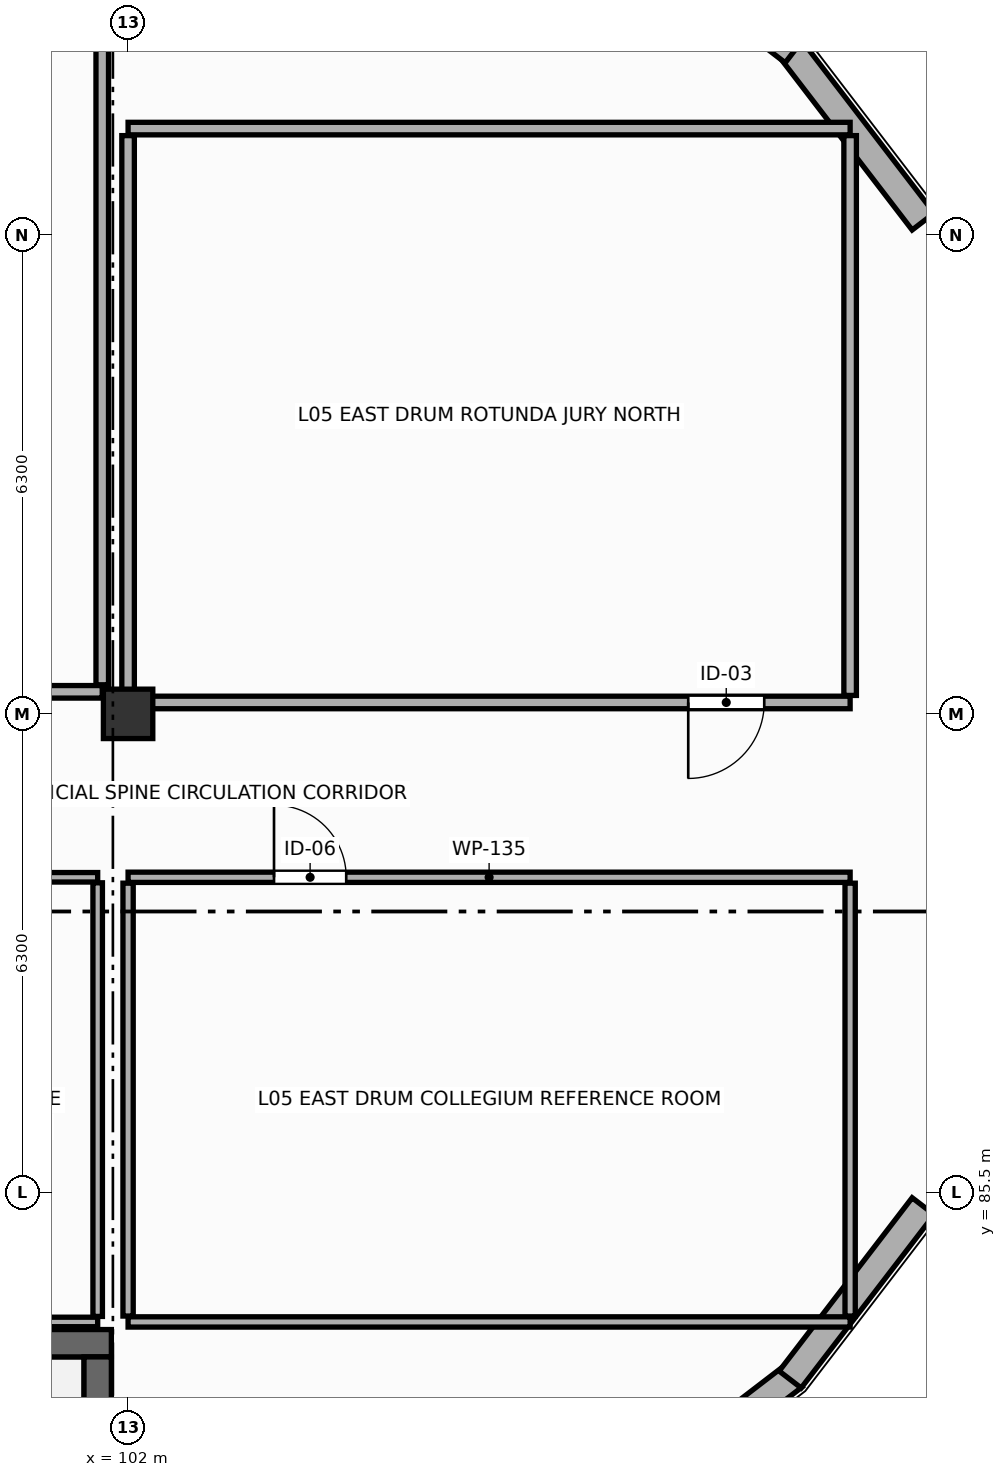
"""IFC4 building model, lengths in metres.
Left out: names, types, materials, properties, quantities, classifications, styles, units other than length and angle.
Written with IfcOpenShell. Run it as: python <this file> out.ifc"""

import sys

from ifc_helpers import new_model, si_unit, direction, frame, frame_2d, origin, origin_2d, place, context, subcontext, project, spatial, rectangle, extrude, element, fill, save


model = new_model("IFC4")
c1 = context("Model", 3, precision=1e-05, world=origin(), true_north=direction((0.0, 1.0)))
c2 = subcontext(c1, "Body", "Model", "MODEL_VIEW")
j1 = project(units=[si_unit("LENGTHUNIT", "METRE"), si_unit("PLANEANGLEUNIT", "RADIAN")], contexts=[c1])
p1 = place(None, origin())
s1 = spatial("IfcSite", under=j1, at=p1, CompositionType="ELEMENT")
p2 = place(p1, origin())
s2 = spatial("IfcBuilding", under=s1, at=p2, CompositionType="ELEMENT")
p3 = place(p2, frame((0.0, 0.0, 18.6)))
s3 = spatial("IfcBuildingStorey", under=s2, at=p3, CompositionType="ELEMENT", Elevation=18.6)
p4 = place(p3, frame((102.0, 91.8, 0.0), z_axis=(0.0, 0.0, 1.0), x_axis=(1.0, 0.0, 0.0)))
e1 = element("IfcColumn", 1, at=p4, inside=s3, PredefinedType="COLUMN", context=c2, shape_type="SweptSolid", body=[
    extrude(rectangle(XDim=0.65, YDim=0.65, at=origin_2d()), origin(), (0.0, 0.0, 1.0), 4.2),
])
p5 = place(p3, frame((108.477, 81.339, 0.0), z_axis=(0.0, 0.0, 1.0), x_axis=(0.793346533164, 0.608770300127, 0.0)))
e2 = element("IfcWall", 2, at=p5, inside=s3, PredefinedType="ELEMENTEDWALL", context=c2, shape_type="SweptSolid", body=[
    extrude(rectangle(XDim=2.874, YDim=0.365, at=frame_2d((1.437, 0.0))), origin(), (0.0, 0.0, 1.0), 2.99),
])
p6 = place(p5, frame((1.037, 0.0, 0.85)))
e3 = element("IfcOpeningElement", 3, at=p6, cuts=e2, PredefinedType="OPENING", context=c2, shape_type="SweptSolid", body=[
    extrude(rectangle(XDim=0.8, YDim=1.7, at=frame_2d((0.4, 0.85))), frame((0.0, 0.192, 0.0), z_axis=(0.0, -1.0, 0.0), x_axis=(1.0, 0.0, 0.0)), (0.0, 0.0, 1.0), 0.385),
])
p7 = place(p3, frame((110.711, 83.042, 0.0), z_axis=(0.0, 0.0, 1.0), x_axis=(0.608729278603, 0.79337800913, 0.0)))
e4 = element("IfcWall", 4, at=p7, inside=s3, PredefinedType="ELEMENTEDWALL", context=c2, shape_type="SweptSolid", body=[
    extrude(rectangle(XDim=2.875, YDim=0.365, at=frame_2d((1.437, 0.0))), origin(), (0.0, 0.0, 1.0), 3.09),
])
p8 = place(p3, frame((112.461, 98.277, 0.0), z_axis=(0.0, 0.0, 1.0), x_axis=(-0.608770300127, 0.793346533164, 0.0)))
e5 = element("IfcWall", 5, at=p8, inside=s3, PredefinedType="ELEMENTEDWALL", context=c2, shape_type="SweptSolid", body=[
    extrude(rectangle(XDim=2.874, YDim=0.365, at=frame_2d((1.437, 0.0))), origin(), (0.0, 0.0, 1.0), 3.09),
])
p9 = place(p3, frame((110.757, 100.511, 0.0), z_axis=(0.0, 0.0, 1.0), x_axis=(-0.793346533164, 0.608770300127, 0.0)))
e6 = element("IfcWall", 6, at=p9, inside=s3, PredefinedType="ELEMENTEDWALL", context=c2, shape_type="SweptSolid", body=[
    extrude(rectangle(XDim=2.874, YDim=0.365, at=frame_2d((1.437, 0.0))), origin(), (0.0, 0.0, 1.0), 2.99),
])
p10 = place(p9, frame((1.037, 0.0, 0.85)))
e7 = element("IfcOpeningElement", 7, at=p10, cuts=e6, PredefinedType="OPENING", context=c2, shape_type="SweptSolid", body=[
    extrude(rectangle(XDim=0.8, YDim=1.7, at=frame_2d((0.4, 0.85))), frame((0.0, 0.192, 0.0), z_axis=(0.0, -1.0, 0.0), x_axis=(1.0, 0.0, 0.0)), (0.0, 0.0, 1.0), 0.385),
])
p11 = place(p3, frame((92.42, 83.52, 0.0), z_axis=(0.0, 0.0, 1.0), x_axis=(1.0, 0.0, 0.0)))
e8 = element("IfcWall", 8, at=p11, inside=s3, PredefinedType="SHEAR", context=c2, shape_type="SweptSolid", body=[
    extrude(rectangle(XDim=9.36, YDim=0.36, at=frame_2d((4.68, 0.0))), origin(), (0.0, 0.0, 1.0), 3.96),
])
p12 = place(p3, frame((101.6, 83.34, 0.0), z_axis=(0.0, 0.0, 1.0), x_axis=(0.0, -1.0, 0.0)))
e9 = element("IfcWall", 9, at=p12, inside=s3, PredefinedType="SHEAR", context=c2, shape_type="SweptSolid", body=[
    extrude(rectangle(XDim=3.36, YDim=0.36, at=frame_2d((1.68, 0.0))), origin(), (0.0, 0.0, 1.0), 3.96),
])
p13 = place(p3, frame((99.1, 89.65, 0.0), z_axis=(0.0, 0.0, 1.0), x_axis=(1.0, 0.0, 0.0)))
e10 = element("IfcWall", 10, at=p13, inside=s3, PredefinedType="PARTITIONING", context=c2, shape_type="SweptSolid", body=[
    extrude(rectangle(XDim=2.5, YDim=0.125, at=frame_2d((1.25, 0.0))), origin(), (0.0, 0.0, 1.0), 3.09),
])
p14 = place(p13, frame((0.75, 0.0, 0.0)))
e11 = element("IfcOpeningElement", 11, at=p14, cuts=e10, PredefinedType="OPENING", context=c2, shape_type="SweptSolid", body=[
    extrude(rectangle(XDim=1.0, YDim=2.1, at=frame_2d((0.5, 1.05))), frame((0.0, 0.073, 0.0), z_axis=(0.0, -1.0, 0.0), x_axis=(1.0, 0.0, 0.0)), (0.0, 0.0, 1.0), 0.145),
])
p15 = place(p3, frame((101.6, 83.8, 0.0), z_axis=(0.0, 0.0, 1.0), x_axis=(-1.0, 0.0, 0.0)))
e12 = element("IfcWall", 12, at=p15, inside=s3, PredefinedType="PARTITIONING", context=c2, shape_type="SweptSolid", body=[
    extrude(rectangle(XDim=2.5, YDim=0.125, at=frame_2d((1.25, 0.0))), origin(), (0.0, 0.0, 1.0), 3.09),
])
p16 = place(p3, frame((101.6, 89.577, 0.0), z_axis=(0.0, 0.0, 1.0), x_axis=(0.0, -1.0, 0.0)))
e13 = element("IfcWall", 13, at=p16, inside=s3, PredefinedType="PARTITIONING", context=c2, shape_type="SweptSolid", body=[
    extrude(rectangle(XDim=5.705, YDim=0.125, at=frame_2d((2.853, 0.0))), origin(), (0.0, 0.0, 1.0), 3.09),
])
p17 = place(p3, frame((101.66, 92.09, 0.0), z_axis=(0.0, 0.0, 1.0), x_axis=(-1.0, 0.0, 0.0)))
e14 = element("IfcWall", 14, at=p17, inside=s3, PredefinedType="PARTITIONING", context=c2, shape_type="SweptSolid", body=[
    extrude(rectangle(XDim=6.62, YDim=0.165, at=frame_2d((3.31, 0.0))), origin(), (0.0, 0.0, 1.0), 3.09),
])
p18 = place(p17, frame((2.573, 0.0, 0.0)))
e15 = element("IfcOpeningElement", 15, at=p18, cuts=e14, PredefinedType="OPENING", context=c2, shape_type="SweptSolid", body=[
    extrude(rectangle(XDim=0.98, YDim=2.2, at=frame_2d((0.49, 1.1))), frame((0.0, 0.093, 0.0), z_axis=(0.0, -1.0, 0.0), x_axis=(1.0, 0.0, 0.0)), (0.0, 0.0, 1.0), 0.185),
])
p19 = place(p3, frame((101.66, 103.981, 0.0), z_axis=(0.0, 0.0, 1.0), x_axis=(0.0, -1.0, 0.0)))
e16 = element("IfcWall", 16, at=p19, inside=s3, PredefinedType="PARTITIONING", context=c2, shape_type="SweptSolid", body=[
    extrude(rectangle(XDim=11.798, YDim=0.165, at=frame_2d((5.899, 0.0))), origin(), (0.0, 0.0, 1.0), 3.09),
])
p20 = place(p3, frame((102.0, 99.5, 0.0), z_axis=(0.0, 0.0, 1.0), x_axis=(1.0, 0.0, 0.0)))
e17 = element("IfcWall", 17, at=p20, inside=s3, PredefinedType="PARTITIONING", context=c2, shape_type="SweptSolid", body=[
    extrude(rectangle(XDim=9.5, YDim=0.165, at=frame_2d((4.75, 0.0))), origin(), (0.0, 0.0, 1.0), 2.99),
])
p21 = place(p3, frame((111.5, 91.95, 0.0), z_axis=(0.0, 0.0, 1.0), x_axis=(-1.0, 0.0, 0.0)))
e18 = element("IfcWall", 18, at=p21, inside=s3, PredefinedType="PARTITIONING", context=c2, shape_type="SweptSolid", body=[
    extrude(rectangle(XDim=9.5, YDim=0.165, at=frame_2d((4.75, 0.0))), origin(), (0.0, 0.0, 1.0), 2.99),
])
p22 = place(p21, frame((1.13, 0.0, 0.0)))
e19 = element("IfcOpeningElement", 19, at=p22, cuts=e18, PredefinedType="OPENING", context=c2, shape_type="SweptSolid", body=[
    extrude(rectangle(XDim=1.0, YDim=2.15, at=frame_2d((0.5, 1.075))), frame((0.0, 0.093, 0.0), z_axis=(0.0, -1.0, 0.0), x_axis=(1.0, 0.0, 0.0)), (0.0, 0.0, 1.0), 0.185),
])
for number, where, z_axis, x_axis in (
    (20, (102.0, 92.042, 0.0), (0.0, 0.0, 1.0), (0.0, 1.0, 0.0)),
    (21, (111.5, 99.407, 0.0), (0.0, 0.0, 1.0), (0.0, -1.0, 0.0)),
):
    element("IfcWall", number, at=place(p3, frame(where, z_axis=z_axis, x_axis=x_axis)), inside=s3, PredefinedType="PARTITIONING", context=c2, shape_type="SweptSolid", body=[
        extrude(rectangle(XDim=7.365, YDim=0.165, at=frame_2d((3.683, 0.0))), origin(), (0.0, 0.0, 1.0), 3.09),
    ])
p23 = place(p3, frame((102.0, 89.65, 0.0), z_axis=(0.0, 0.0, 1.0), x_axis=(1.0, 0.0, 0.0)))
e22 = element("IfcWall", 22, at=p23, inside=s3, PredefinedType="PARTITIONING", context=c2, shape_type="SweptSolid", body=[
    extrude(rectangle(XDim=9.5, YDim=0.135, at=frame_2d((4.75, 0.0))), origin(), (0.0, 0.0, 1.0), 2.99),
])
p24 = place(p23, frame((1.92, 0.0, 0.0)))
e23 = element("IfcOpeningElement", 23, at=p24, cuts=e22, PredefinedType="OPENING", context=c2, shape_type="SweptSolid", body=[
    extrude(rectangle(XDim=0.95, YDim=2.15, at=frame_2d((0.475, 1.075))), frame((0.0, 0.077, 0.0), z_axis=(0.0, -1.0, 0.0), x_axis=(1.0, 0.0, 0.0)), (0.0, 0.0, 1.0), 0.155),
])
p25 = place(p3, frame((111.5, 83.8, 0.0), z_axis=(0.0, 0.0, 1.0), x_axis=(-1.0, 0.0, 0.0)))
e24 = element("IfcWall", 24, at=p25, inside=s3, PredefinedType="PARTITIONING", context=c2, shape_type="SweptSolid", body=[
    extrude(rectangle(XDim=9.5, YDim=0.135, at=frame_2d((4.75, 0.0))), origin(), (0.0, 0.0, 1.0), 2.99),
])
p26 = place(p3, frame((102.0, 83.877, 0.0), z_axis=(0.0, 0.0, 1.0), x_axis=(0.0, 1.0, 0.0)))
e25 = element("IfcWall", 25, at=p26, inside=s3, PredefinedType="PARTITIONING", context=c2, shape_type="SweptSolid", body=[
    extrude(rectangle(XDim=5.695, YDim=0.135, at=frame_2d((2.848, 0.0))), origin(), (0.0, 0.0, 1.0), 3.09),
])
p27 = place(p3, frame((111.5, 89.573, 0.0), z_axis=(0.0, 0.0, 1.0), x_axis=(0.0, -1.0, 0.0)))
e26 = element("IfcWall", 26, at=p27, inside=s3, PredefinedType="PARTITIONING", context=c2, shape_type="SweptSolid", body=[
    extrude(rectangle(XDim=5.695, YDim=0.135, at=frame_2d((2.848, 0.0))), origin(), (0.0, 0.0, 1.0), 3.59),
])
p28 = place(p22, origin())
e27 = element("IfcDoor", 27, at=p28, inside=s3, OperationType="SINGLE_SWING_RIGHT", PredefinedType="DOOR", context=c2, shape_type="SweptSolid", body=[
    extrude(rectangle(XDim=1.0, YDim=2.15, at=frame_2d((0.5, 1.075))), frame((0.0, 0.025, 0.0), z_axis=(0.0, -1.0, 0.0), x_axis=(1.0, 0.0, 0.0)), (0.0, 0.0, 1.0), 0.05),
])
fill(e19, e27)
p29 = place(p24, origin())
e28 = element("IfcDoor", 28, at=p29, inside=s3, OperationType="SINGLE_SWING_LEFT", PredefinedType="DOOR", context=c2, shape_type="SweptSolid", body=[
    extrude(rectangle(XDim=0.95, YDim=2.15, at=frame_2d((0.475, 1.075))), frame((0.0, 0.025, 0.0), z_axis=(0.0, -1.0, 0.0), x_axis=(1.0, 0.0, 0.0)), (0.0, 0.0, 1.0), 0.05),
])
fill(e23, e28)
save(model, sys.argv[1])
